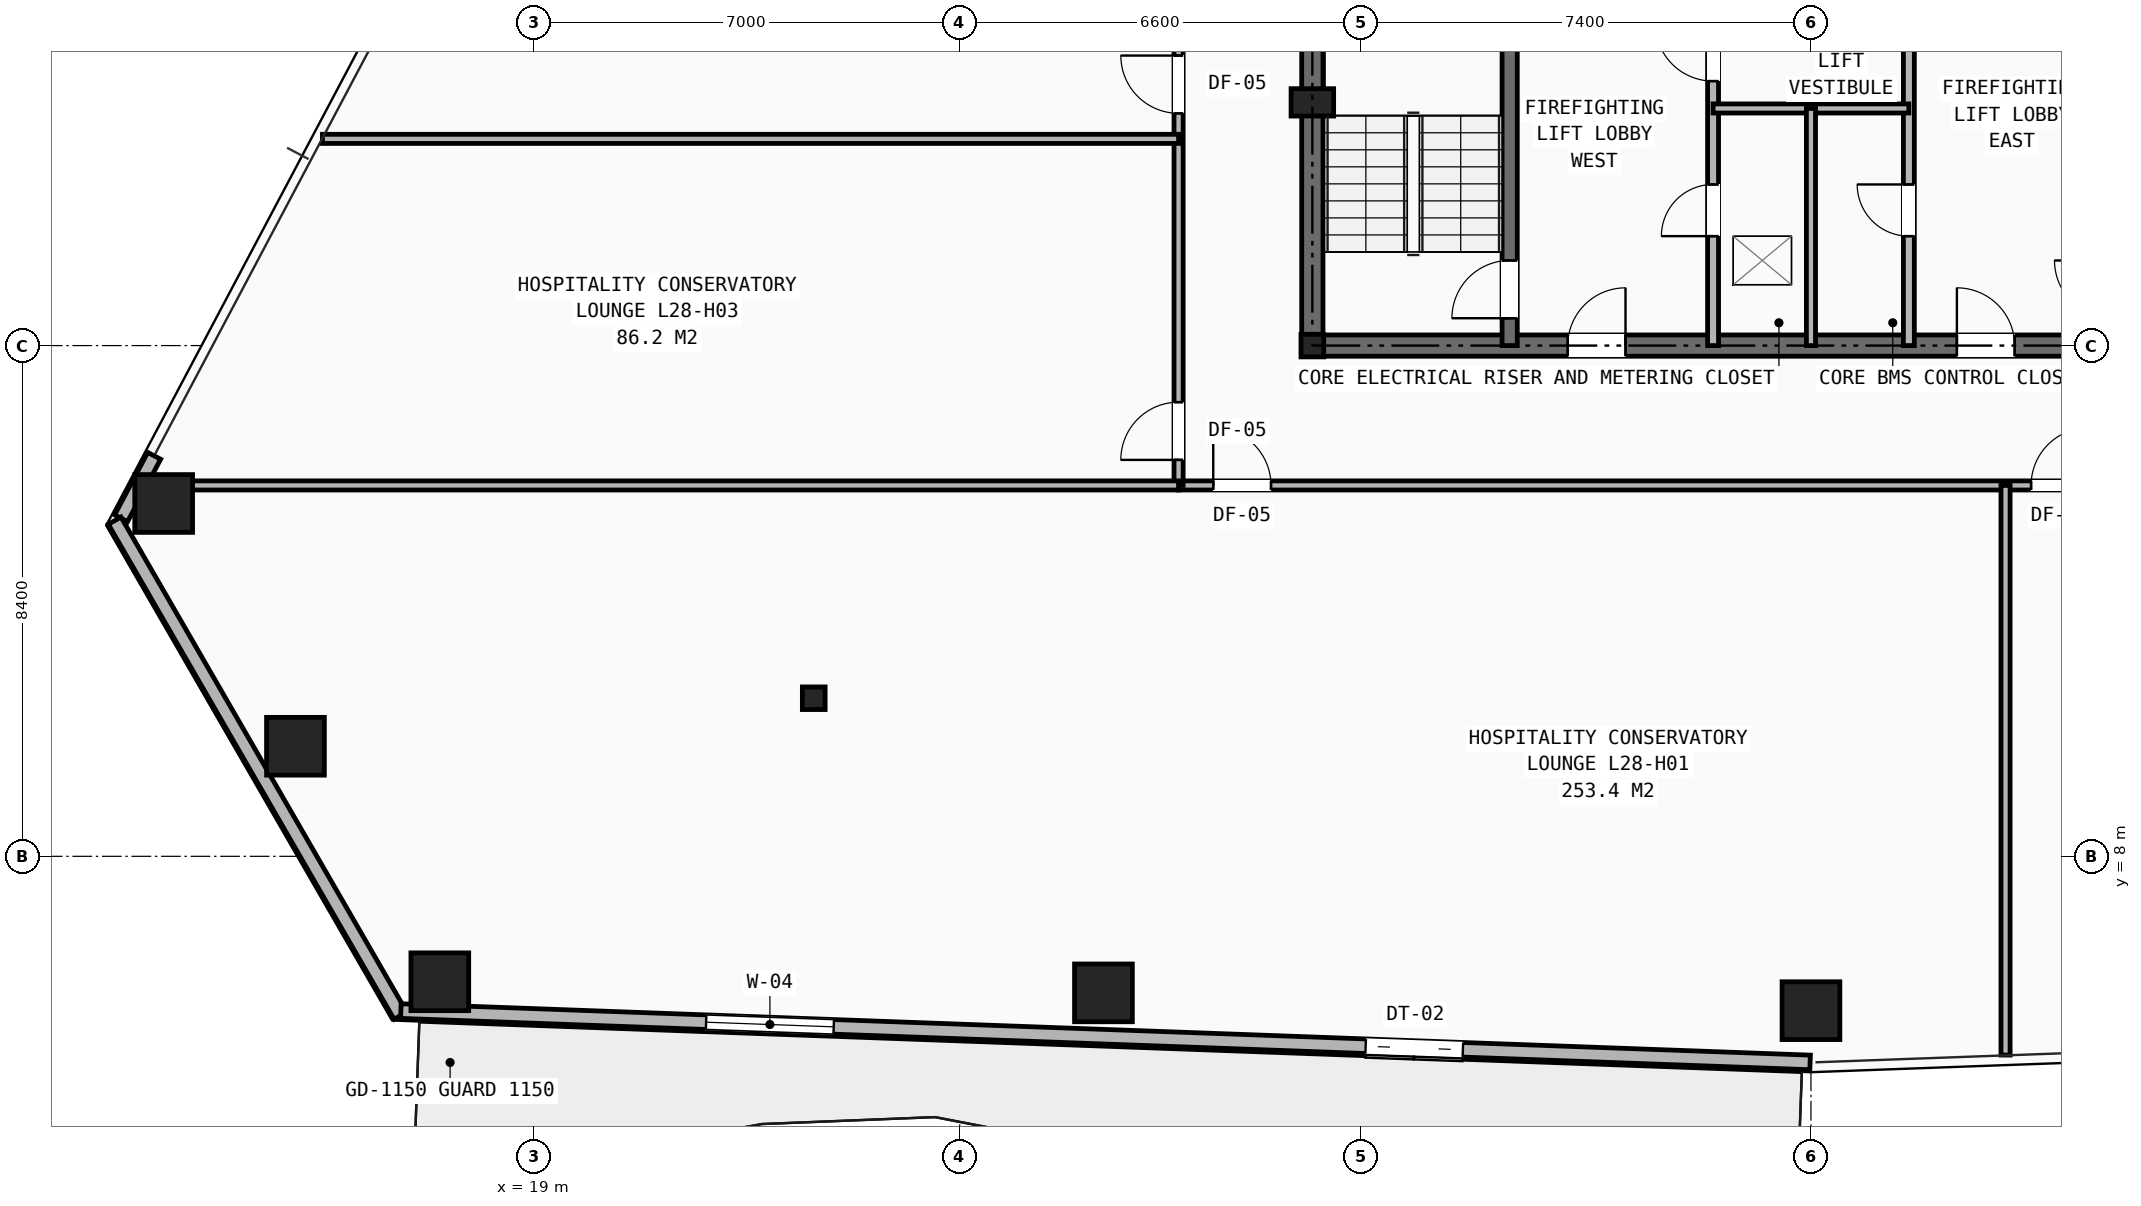
"""IFC4 building model, lengths in metres.
Left out: names, types, materials, properties, quantities, classifications, styles, units other than length and angle.
Written with IfcOpenShell. Run it as: python <this file> out.ifc"""

import sys

from ifc_helpers import new_model, si_unit, direction, frame, frame_2d, origin, origin_2d, place, context, subcontext, project, spatial, rectangle, hollow_rectangle, i_section, extrude, element, fill, save


model = new_model("IFC4")
c1 = context("Model", 3, precision=1e-05, world=origin(), true_north=direction((0.0, 1.0)))
c2 = subcontext(c1, "Body", "Model", "MODEL_VIEW")
j1 = project(units=[si_unit("LENGTHUNIT", "METRE"), si_unit("PLANEANGLEUNIT", "RADIAN")], contexts=[c1])
p1 = place(None, origin())
s1 = spatial("IfcSite", under=j1, at=p1, CompositionType="ELEMENT")
p2 = place(p1, origin())
s2 = spatial("IfcBuilding", under=s1, at=p2, CompositionType="ELEMENT")
p3 = place(p2, frame((0.0, 0.0, 99.0)))
s3 = spatial("IfcBuildingStorey", under=s2, at=p3, CompositionType="ELEMENT", Elevation=99.0)
for number, where, z_axis, x_axis in (
    (1, (31.8, 16.4, 0.0), (0.0, 0.0, 1.0), (1.0, 0.0, 0.0)),
    (2, (23.6, 10.6, 0.0), (0.0, 0.0, 1.0), (1.0, 0.0, 0.0)),
):
    element("IfcColumn", number, at=place(p3, frame(where, z_axis=z_axis, x_axis=x_axis)), inside=s3, PredefinedType="COLUMN", context=c2, shape_type="SweptSolid", body=[
        extrude(i_section(OverallWidth=0.374, OverallDepth=0.372, WebThickness=0.016, FlangeThickness=0.026, at=origin_2d()), origin(), (0.0, 0.0, 1.0), 3.2),
    ])
p4 = place(p3, frame((31.8, 20.4, 0.0), z_axis=(0.0, 0.0, 1.0), x_axis=(1.0, 0.0, 0.0)))
e3 = element("IfcColumn", 3, at=p4, inside=s3, PredefinedType="PILASTER", context=c2, shape_type="SweptSolid", body=[
    extrude(rectangle(XDim=0.7, YDim=0.45, at=origin_2d()), origin(), (0.0, 0.0, 1.0), 3.2),
])
for number, where, z_axis, x_axis in (
    (4, (12.909, 13.803, 0.0), (0.0, 0.0, 1.0), (1.0, 0.0, 0.0)),
    (5, (15.076, 9.81, 0.0), (0.0, 0.0, 1.0), (1.0, 0.0, 0.0)),
    (6, (17.451, 5.937, 0.0), (0.0, 0.0, 1.0), (1.0, 0.0, 0.0)),
    (7, (28.364, 5.754, 0.0), (0.0, 0.0, 1.0), (1.0, 0.0, 0.0)),
    (8, (40.0, 5.461, 0.0), (0.0, 0.0, 1.0), (1.0, 0.0, 0.0)),
):
    element("IfcColumn", number, at=place(p3, frame(where, z_axis=z_axis, x_axis=x_axis)), inside=s3, PredefinedType="COLUMN", context=c2, shape_type="SweptSolid", body=[
        extrude(hollow_rectangle(XDim=0.95, YDim=0.95, WallThickness=0.065, at=origin_2d()), origin(), (0.0, 0.0, 1.0), 3.2),
    ])
p5 = place(p3, frame((12.753, 14.587, 0.0), z_axis=(0.0, 0.0, 1.0), x_axis=(-0.468090329887, -0.883680622774, 0.0)))
e9 = element("IfcWall", 9, at=p5, inside=s3, PredefinedType="SHEAR", context=c2, shape_type="SweptSolid", body=[
    extrude(rectangle(XDim=1.163, YDim=0.24, at=frame_2d((0.581, 0.0))), origin(), (0.0, 0.0, 1.0), 2.253),
])
p6 = place(p3, frame((16.803, 5.38, 0.0), z_axis=(0.0, 0.0, 1.0), x_axis=(-0.499996739618, 0.866027286158, 0.0)))
e10 = element("IfcWall", 10, at=p6, inside=s3, PredefinedType="SHEAR", context=c2, shape_type="SweptSolid", body=[
    extrude(rectangle(XDim=9.4, YDim=0.24, at=frame_2d((4.7, 0.0))), origin(), (0.0, 0.0, 1.0), 2.253),
])
p7 = place(p3, frame((39.986, 4.61, 0.0), z_axis=(0.0, 0.0, 1.0), x_axis=(-0.999336422059, 0.036424106652, 0.0)))
e11 = element("IfcWall", 11, at=p7, inside=s3, PredefinedType="SHEAR", context=c2, shape_type="SweptSolid", body=[
    extrude(rectangle(XDim=23.191, YDim=0.24, at=frame_2d((11.596, 0.0))), origin(), (0.0, 0.0, 1.0), 2.253),
])
p8 = place(p7, frame((5.714, 0.0, 0.0)))
e12 = element("IfcOpeningElement", 12, at=p8, cuts=e11, PredefinedType="OPENING", context=c2, shape_type="SweptSolid", body=[
    extrude(rectangle(XDim=1.6, YDim=2.04, at=frame_2d((0.8, 1.02))), frame((0.0, 0.13, 0.0), z_axis=(0.0, -1.0, 0.0), x_axis=(1.0, 0.0, 0.0)), (0.0, 0.0, 1.0), 0.26),
])
p9 = place(p7, frame((16.068, 0.0, 0.25)))
e13 = element("IfcOpeningElement", 13, at=p9, cuts=e11, PredefinedType="OPENING", context=c2, shape_type="SweptSolid", body=[
    extrude(rectangle(XDim=2.1, YDim=1.7, at=frame_2d((1.05, 0.85))), frame((0.0, 0.13, 0.0), z_axis=(0.0, -1.0, 0.0), x_axis=(1.0, 0.0, 0.0)), (0.0, 0.0, 1.0), 0.26),
])
p10 = place(p3, frame((31.8, 16.4, 0.0), z_axis=(0.0, 0.0, 1.0), x_axis=(1.0, 0.0, 0.0)))
e14 = element("IfcWall", 14, at=p10, inside=s3, PredefinedType="SHEAR", context=c2, shape_type="SweptSolid", body=[
    extrude(rectangle(XDim=16.4, YDim=0.35, at=frame_2d((8.2, 0.0))), origin(), (0.0, 0.0, 1.0), 2.97),
])
p11 = place(p10, frame((4.2, 0.0, 0.0)))
e15 = element("IfcOpeningElement", 15, at=p11, cuts=e14, PredefinedType="OPENING", context=c2, shape_type="SweptSolid", body=[
    extrude(rectangle(XDim=0.95, YDim=2.1, at=frame_2d((0.475, 1.05))), frame((0.0, 0.185, 0.0), z_axis=(0.0, -1.0, 0.0), x_axis=(1.0, 0.0, 0.0)), (0.0, 0.0, 1.0), 0.37),
])
p12 = place(p10, frame((10.6, 0.0, 0.0)))
e16 = element("IfcOpeningElement", 16, at=p12, cuts=e14, PredefinedType="OPENING", context=c2, shape_type="SweptSolid", body=[
    extrude(rectangle(XDim=0.95, YDim=2.1, at=frame_2d((0.475, 1.05))), frame((0.0, 0.185, 0.0), z_axis=(0.0, -1.0, 0.0), x_axis=(1.0, 0.0, 0.0)), (0.0, 0.0, 1.0), 0.37),
])
p13 = place(p3, frame((31.8, 16.4, 0.0), z_axis=(0.0, 0.0, 1.0), x_axis=(0.0, 1.0, 0.0)))
e17 = element("IfcWall", 17, at=p13, inside=s3, PredefinedType="SHEAR", context=c2, shape_type="SweptSolid", body=[
    extrude(rectangle(XDim=14.8, YDim=0.35, at=frame_2d((7.4, 0.0))), origin(), (0.0, 0.0, 1.0), 2.97),
])
p14 = place(p13, frame((11.0, 0.0, 0.0)))
e18 = element("IfcOpeningElement", 18, at=p14, cuts=e17, PredefinedType="OPENING", context=c2, shape_type="SweptSolid", body=[
    extrude(rectangle(XDim=1.1, YDim=2.15, at=frame_2d((0.55, 1.075))), frame((0.0, 0.185, 0.0), z_axis=(0.0, -1.0, 0.0), x_axis=(1.0, 0.0, 0.0)), (0.0, 0.0, 1.0), 0.37),
])
p15 = place(p3, frame((35.045, 16.4, 0.0), z_axis=(0.0, 0.0, 1.0), x_axis=(0.0, 1.0, 0.0)))
e19 = element("IfcWall", 19, at=p15, inside=s3, PredefinedType="SHEAR", context=c2, shape_type="SweptSolid", body=[
    extrude(rectangle(XDim=8.4, YDim=0.25, at=frame_2d((4.2, 0.0))), origin(), (0.0, 0.0, 1.0), 2.97),
])
p16 = place(p15, frame((0.45, 0.0, 0.0)))
e20 = element("IfcOpeningElement", 20, at=p16, cuts=e19, PredefinedType="OPENING", context=c2, shape_type="SweptSolid", body=[
    extrude(rectangle(XDim=0.95, YDim=2.1, at=frame_2d((0.475, 1.05))), frame((0.0, 0.135, 0.0), z_axis=(0.0, -1.0, 0.0), x_axis=(1.0, 0.0, 0.0)), (0.0, 0.0, 1.0), 0.27),
])
p17 = place(p3, frame((38.39, 16.4, 0.0), z_axis=(0.0, 0.0, 1.0), x_axis=(0.0, 1.0, 0.0)))
e21 = element("IfcWall", 21, at=p17, inside=s3, PredefinedType="PARTITIONING", context=c2, shape_type="SweptSolid", body=[
    extrude(rectangle(XDim=8.4, YDim=0.18, at=frame_2d((4.2, 0.0))), origin(), (0.0, 0.0, 1.0), 2.421),
])
p18 = place(p17, frame((1.8, 0.0, 0.0)))
e22 = element("IfcOpeningElement", 22, at=p18, cuts=e21, PredefinedType="OPENING", context=c2, shape_type="SweptSolid", body=[
    extrude(rectangle(XDim=0.85, YDim=2.05, at=frame_2d((0.425, 1.025))), frame((0.0, 0.1, 0.0), z_axis=(0.0, -1.0, 0.0), x_axis=(1.0, 0.0, 0.0)), (0.0, 0.0, 1.0), 0.2),
])
p19 = place(p17, frame((4.35, 0.0, 0.0)))
e23 = element("IfcOpeningElement", 23, at=p19, cuts=e21, PredefinedType="OPENING", context=c2, shape_type="SweptSolid", body=[
    extrude(rectangle(XDim=0.95, YDim=2.1, at=frame_2d((0.475, 1.05))), frame((0.0, 0.1, 0.0), z_axis=(0.0, -1.0, 0.0), x_axis=(1.0, 0.0, 0.0)), (0.0, 0.0, 1.0), 0.2),
])
p20 = place(p3, frame((41.61, 16.4, 0.0), z_axis=(0.0, 0.0, 1.0), x_axis=(0.0, 1.0, 0.0)))
e24 = element("IfcWall", 24, at=p20, inside=s3, PredefinedType="PARTITIONING", context=c2, shape_type="SweptSolid", body=[
    extrude(rectangle(XDim=8.4, YDim=0.18, at=frame_2d((4.2, 0.0))), origin(), (0.0, 0.0, 1.0), 2.421),
])
p21 = place(p20, frame((1.8, 0.0, 0.0)))
e25 = element("IfcOpeningElement", 25, at=p21, cuts=e24, PredefinedType="OPENING", context=c2, shape_type="SweptSolid", body=[
    extrude(rectangle(XDim=0.85, YDim=2.05, at=frame_2d((0.425, 1.025))), frame((0.0, 0.1, 0.0), z_axis=(0.0, -1.0, 0.0), x_axis=(1.0, 0.0, 0.0)), (0.0, 0.0, 1.0), 0.2),
])
p22 = place(p3, frame((38.39, 20.3, 0.0), z_axis=(0.0, 0.0, 1.0), x_axis=(1.0, 0.0, 0.0)))
e26 = element("IfcWall", 26, at=p22, inside=s3, PredefinedType="PARTITIONING", context=c2, shape_type="SweptSolid", body=[
    extrude(rectangle(XDim=3.22, YDim=0.15, at=frame_2d((1.61, 0.0))), origin(), (0.0, 0.0, 1.0), 2.97),
])
p23 = place(p3, frame((40.0, 16.4, 0.0), z_axis=(0.0, 0.0, 1.0), x_axis=(0.0, 1.0, 0.0)))
e27 = element("IfcWall", 27, at=p23, inside=s3, PredefinedType="PARTITIONING", context=c2, shape_type="SweptSolid", body=[
    extrude(rectangle(XDim=3.9, YDim=0.15, at=frame_2d((1.95, 0.0))), origin(), (0.0, 0.0, 1.0), 2.421),
])
p24 = place(p3, frame((29.6, 14.1, 0.0), z_axis=(0.0, 0.0, 1.0), x_axis=(1.0, 0.0, 0.0)))
e28 = element("IfcWall", 28, at=p24, inside=s3, PredefinedType="PARTITIONING", context=c2, shape_type="SweptSolid", body=[
    extrude(rectangle(XDim=20.8, YDim=0.15, at=frame_2d((10.4, 0.0))), origin(), (0.0, 0.0, 1.0), 2.181),
])
p25 = place(p24, frame((0.57, 0.0, 0.0)))
e29 = element("IfcOpeningElement", 29, at=p25, cuts=e28, PredefinedType="OPENING", context=c2, shape_type="SweptSolid", body=[
    extrude(rectangle(XDim=0.95, YDim=2.1, at=frame_2d((0.475, 1.05))), frame((0.0, 0.085, 0.0), z_axis=(0.0, -1.0, 0.0), x_axis=(1.0, 0.0, 0.0)), (0.0, 0.0, 1.0), 0.17),
])
p26 = place(p24, frame((14.02, 0.0, 0.0)))
e30 = element("IfcOpeningElement", 30, at=p26, cuts=e28, PredefinedType="OPENING", context=c2, shape_type="SweptSolid", body=[
    extrude(rectangle(XDim=0.95, YDim=2.1, at=frame_2d((0.475, 1.05))), frame((0.0, 0.085, 0.0), z_axis=(0.0, -1.0, 0.0), x_axis=(1.0, 0.0, 0.0)), (0.0, 0.0, 1.0), 0.17),
])
p27 = place(p3, frame((29.6, 14.1, 0.0), z_axis=(0.0, 0.0, 1.0), x_axis=(0.0, 1.0, 0.0)))
e31 = element("IfcWall", 31, at=p27, inside=s3, PredefinedType="PARTITIONING", context=c2, shape_type="SweptSolid", body=[
    extrude(rectangle(XDim=21.9, YDim=0.15, at=frame_2d((10.95, 0.0))), origin(), (0.0, 0.0, 1.0), 2.181),
])
p28 = place(p27, frame((0.42, 0.0, 0.0)))
e32 = element("IfcOpeningElement", 32, at=p28, cuts=e31, PredefinedType="OPENING", context=c2, shape_type="SweptSolid", body=[
    extrude(rectangle(XDim=0.95, YDim=2.1, at=frame_2d((0.475, 1.05))), frame((0.0, 0.085, 0.0), z_axis=(0.0, -1.0, 0.0), x_axis=(1.0, 0.0, 0.0)), (0.0, 0.0, 1.0), 0.17),
])
p29 = place(p27, frame((6.12, 0.0, 0.0)))
e33 = element("IfcOpeningElement", 33, at=p29, cuts=e31, PredefinedType="OPENING", context=c2, shape_type="SweptSolid", body=[
    extrude(rectangle(XDim=0.95, YDim=2.1, at=frame_2d((0.475, 1.05))), frame((0.0, 0.085, 0.0), z_axis=(0.0, -1.0, 0.0), x_axis=(1.0, 0.0, 0.0)), (0.0, 0.0, 1.0), 0.17),
])
p30 = place(p27, frame((14.12, 0.0, 0.0)))
e34 = element("IfcOpeningElement", 34, at=p30, cuts=e31, PredefinedType="OPENING", context=c2, shape_type="SweptSolid", body=[
    extrude(rectangle(XDim=0.95, YDim=2.1, at=frame_2d((0.475, 1.05))), frame((0.0, 0.085, 0.0), z_axis=(0.0, -1.0, 0.0), x_axis=(1.0, 0.0, 0.0)), (0.0, 0.0, 1.0), 0.17),
])
p31 = place(p3, frame((43.2, 4.731, 0.0), z_axis=(0.0, 0.0, 1.0), x_axis=(0.0, 1.0, 0.0)))
e35 = element("IfcWall", 35, at=p31, inside=s3, PredefinedType="PARTITIONING", context=c2, shape_type="SweptSolid", body=[
    extrude(rectangle(XDim=9.369, YDim=0.15, at=frame_2d((4.685, 0.0))), origin(), (0.0, 0.0, 1.0), 2.258),
])
p32 = place(p3, frame((12.5, 14.1, 0.0), z_axis=(0.0, 0.0, 1.0), x_axis=(1.0, 0.0, 0.0)))
e36 = element("IfcWall", 36, at=p32, inside=s3, PredefinedType="PARTITIONING", context=c2, shape_type="SweptSolid", body=[
    extrude(rectangle(XDim=17.1, YDim=0.15, at=frame_2d((8.55, 0.0))), origin(), (0.0, 0.0, 1.0), 2.181),
])
p33 = place(p3, frame((15.52, 19.8, 0.0), z_axis=(0.0, 0.0, 1.0), x_axis=(1.0, 0.0, 0.0)))
e37 = element("IfcWall", 37, at=p33, inside=s3, PredefinedType="PARTITIONING", context=c2, shape_type="SweptSolid", body=[
    extrude(rectangle(XDim=14.08, YDim=0.15, at=frame_2d((7.04, 0.0))), origin(), (0.0, 0.0, 1.0), 2.258),
])
p34 = place(p8, origin())
e38 = element("IfcDoor", 38, at=p34, inside=s3, OperationType="SINGLE_SWING_LEFT", PredefinedType="DOOR", context=c2, shape_type="SweptSolid", body=[
    extrude(rectangle(XDim=1.6, YDim=2.04, at=frame_2d((0.8, 1.02))), frame((0.0, 0.025, 0.0), z_axis=(0.0, -1.0, 0.0), x_axis=(1.0, 0.0, 0.0)), (0.0, 0.0, 1.0), 0.05),
])
fill(e12, e38)
p35 = place(p9, origin())
e39 = element("IfcWindow", 39, at=p35, inside=s3, PartitioningType="SINGLE_PANEL", PredefinedType="WINDOW", context=c2, shape_type="SweptSolid", body=[
    extrude(rectangle(XDim=2.1, YDim=1.7, at=frame_2d((1.05, 0.85))), frame((0.0, 0.03, 0.0), z_axis=(0.0, -1.0, 0.0), x_axis=(1.0, 0.0, 0.0)), (0.0, 0.0, 1.0), 0.06),
])
fill(e13, e39)
p36 = place(p18, origin())
e40 = element("IfcDoor", 40, at=p36, inside=s3, OperationType="SINGLE_SWING_LEFT", PredefinedType="DOOR", context=c2, shape_type="SweptSolid", body=[
    extrude(rectangle(XDim=0.85, YDim=2.05, at=frame_2d((0.425, 1.025))), frame((0.0, 0.025, 0.0), z_axis=(0.0, -1.0, 0.0), x_axis=(1.0, 0.0, 0.0)), (0.0, 0.0, 1.0), 0.05),
])
fill(e22, e40)
p37 = place(p21, origin())
e41 = element("IfcDoor", 41, at=p37, inside=s3, OperationType="SINGLE_SWING_RIGHT", PredefinedType="DOOR", context=c2, shape_type="SweptSolid", body=[
    extrude(rectangle(XDim=0.85, YDim=2.05, at=frame_2d((0.425, 1.025))), frame((0.0, 0.025, 0.0), z_axis=(0.0, -1.0, 0.0), x_axis=(1.0, 0.0, 0.0)), (0.0, 0.0, 1.0), 0.05),
])
fill(e25, e41)
p38 = place(p19, origin())
e42 = element("IfcDoor", 42, at=p38, inside=s3, OperationType="SINGLE_SWING_RIGHT", PredefinedType="DOOR", context=c2, shape_type="SweptSolid", body=[
    extrude(rectangle(XDim=0.95, YDim=2.1, at=frame_2d((0.475, 1.05))), frame((0.0, 0.025, 0.0), z_axis=(0.0, -1.0, 0.0), x_axis=(1.0, 0.0, 0.0)), (0.0, 0.0, 1.0), 0.05),
])
fill(e23, e42)
p39 = place(p16, origin())
e43 = element("IfcDoor", 43, at=p39, inside=s3, OperationType="SINGLE_SWING_LEFT", PredefinedType="DOOR", context=c2, shape_type="SweptSolid", body=[
    extrude(rectangle(XDim=0.95, YDim=2.1, at=frame_2d((0.475, 1.05))), frame((0.0, 0.025, 0.0), z_axis=(0.0, -1.0, 0.0), x_axis=(1.0, 0.0, 0.0)), (0.0, 0.0, 1.0), 0.05),
])
fill(e20, e43)
p40 = place(p11, origin())
e44 = element("IfcDoor", 44, at=p40, inside=s3, OperationType="SINGLE_SWING_RIGHT", PredefinedType="DOOR", context=c2, shape_type="SweptSolid", body=[
    extrude(rectangle(XDim=0.95, YDim=2.1, at=frame_2d((0.475, 1.05))), frame((0.0, 0.025, 0.0), z_axis=(0.0, -1.0, 0.0), x_axis=(1.0, 0.0, 0.0)), (0.0, 0.0, 1.0), 0.05),
])
fill(e15, e44)
p41 = place(p12, origin())
e45 = element("IfcDoor", 45, at=p41, inside=s3, OperationType="SINGLE_SWING_LEFT", PredefinedType="DOOR", context=c2, shape_type="SweptSolid", body=[
    extrude(rectangle(XDim=0.95, YDim=2.1, at=frame_2d((0.475, 1.05))), frame((0.0, 0.025, 0.0), z_axis=(0.0, -1.0, 0.0), x_axis=(1.0, 0.0, 0.0)), (0.0, 0.0, 1.0), 0.05),
])
fill(e16, e45)
p42 = place(p25, origin())
e46 = element("IfcDoor", 46, at=p42, inside=s3, OperationType="SINGLE_SWING_LEFT", PredefinedType="DOOR", context=c2, shape_type="SweptSolid", body=[
    extrude(rectangle(XDim=0.95, YDim=2.1, at=frame_2d((0.475, 1.05))), frame((0.0, 0.025, 0.0), z_axis=(0.0, -1.0, 0.0), x_axis=(1.0, 0.0, 0.0)), (0.0, 0.0, 1.0), 0.05),
])
fill(e29, e46)
p43 = place(p26, origin())
e47 = element("IfcDoor", 47, at=p43, inside=s3, OperationType="SINGLE_SWING_RIGHT", PredefinedType="DOOR", context=c2, shape_type="SweptSolid", body=[
    extrude(rectangle(XDim=0.95, YDim=2.1, at=frame_2d((0.475, 1.05))), frame((0.0, 0.025, 0.0), z_axis=(0.0, -1.0, 0.0), x_axis=(1.0, 0.0, 0.0)), (0.0, 0.0, 1.0), 0.05),
])
fill(e30, e47)
p44 = place(p28, origin())
e48 = element("IfcDoor", 48, at=p44, inside=s3, OperationType="SINGLE_SWING_LEFT", PredefinedType="DOOR", context=c2, shape_type="SweptSolid", body=[
    extrude(rectangle(XDim=0.95, YDim=2.1, at=frame_2d((0.475, 1.05))), frame((0.0, 0.025, 0.0), z_axis=(0.0, -1.0, 0.0), x_axis=(1.0, 0.0, 0.0)), (0.0, 0.0, 1.0), 0.05),
])
fill(e32, e48)
p45 = place(p29, origin())
e49 = element("IfcDoor", 49, at=p45, inside=s3, OperationType="SINGLE_SWING_RIGHT", PredefinedType="DOOR", context=c2, shape_type="SweptSolid", body=[
    extrude(rectangle(XDim=0.95, YDim=2.1, at=frame_2d((0.475, 1.05))), frame((0.0, 0.025, 0.0), z_axis=(0.0, -1.0, 0.0), x_axis=(1.0, 0.0, 0.0)), (0.0, 0.0, 1.0), 0.05),
])
fill(e33, e49)
save(model, sys.argv[1])
